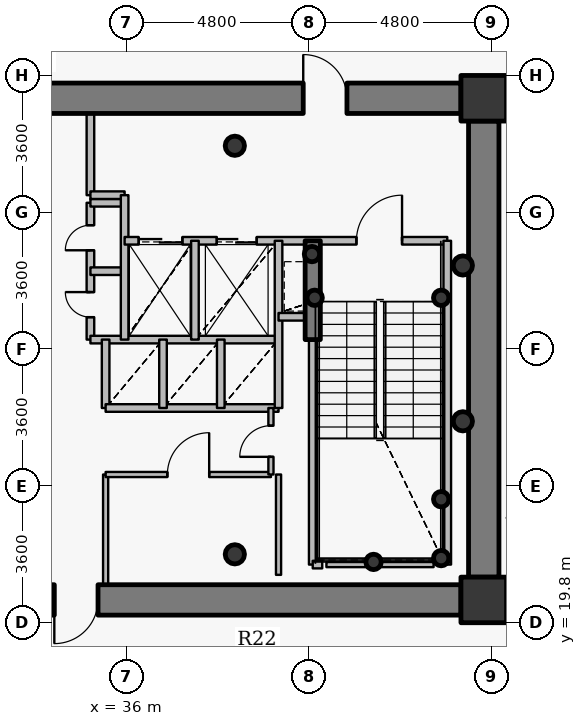
"""IFC4 building model, lengths in metres.
Left out: names, types, materials, properties, quantities, classifications, styles, units other than length and angle.
Written with IfcOpenShell. Run it as: python <this file> out.ifc"""

import sys

from ifc_helpers import new_model, si_unit, direction, frame, frame_2d, origin, origin_2d, place, context, subcontext, project, spatial, rectangle, hollow_circle, extrude, source, transform, mapped, element, fill, save


model = new_model("IFC4")
c1 = context("Model", 3, precision=1e-05, world=origin(), true_north=direction((0.0, 1.0)))
c2 = subcontext(c1, "Body", "Model", "MODEL_VIEW")
j1 = project(units=[si_unit("LENGTHUNIT", "METRE"), si_unit("PLANEANGLEUNIT", "RADIAN")], contexts=[c1])
p1 = place(None, origin())
s1 = spatial("IfcSite", under=j1, at=p1, CompositionType="ELEMENT")
p2 = place(p1, origin())
s2 = spatial("IfcBuilding", under=s1, at=p2, CompositionType="ELEMENT")
p3 = place(p2, frame((0.0, 0.0, 189.9)))
s3 = spatial("IfcBuildingStorey", under=s2, at=p3, CompositionType="ELEMENT", Elevation=189.9)
for number, where, z_axis, x_axis in (
    (1, (45.4, 20.4, 0.0), (0.0, 0.0, 1.0), (1.0, 0.0, 0.0)),
    (2, (45.4, 33.6, 0.0), (0.0, 0.0, 1.0), (1.0, 0.0, 0.0)),
):
    element("IfcColumn", number, at=place(p3, frame(where, z_axis=z_axis, x_axis=x_axis)), inside=s3, PredefinedType="COLUMN", context=c2, shape_type="SweptSolid", body=[
        extrude(rectangle(XDim=1.2, YDim=1.2, at=origin_2d()), origin(), (0.0, 0.0, 1.0), 3.75),
    ])
for number, where, z_axis, x_axis in (
    (3, (38.85, 21.6, 0.0), (0.0, 0.0, 1.0), (1.0, 0.0, 0.0)),
    (4, (38.85, 32.35, 0.0), (0.0, 0.0, 1.0), (1.0, 0.0, 0.0)),
):
    element("IfcColumn", number, at=place(p3, frame(where, z_axis=z_axis, x_axis=x_axis)), inside=s3, PredefinedType="COLUMN", context=c2, shape_type="SweptSolid", body=[
        extrude(hollow_circle(Radius=0.254, WallThickness=0.02, at=origin_2d()), origin(), (0.0, 0.0, 1.0), 3.75),
    ])
for number, where, z_axis, x_axis in (
    (5, (44.28, 21.5, 0.0), (0.0, 0.0, 1.0), (1.0, 0.0, 0.0)),
    (6, (44.28, 23.05, 0.0), (0.0, 0.0, 1.0), (1.0, 0.0, 0.0)),
    (7, (42.5, 21.4, 0.0), (0.0, 0.0, 1.0), (1.0, 0.0, 0.0)),
    (8, (40.95, 28.35, 0.0), (0.0, 0.0, 1.0), (1.0, 0.0, 0.0)),
    (9, (44.28, 28.35, 0.0), (0.0, 0.0, 1.0), (1.0, 0.0, 0.0)),
    (10, (40.88, 29.5, 0.0), (0.0, 0.0, 1.0), (1.0, 0.0, 0.0)),
):
    element("IfcColumn", number, at=place(p3, frame(where, z_axis=z_axis, x_axis=x_axis)), inside=s3, PredefinedType="COLUMN", context=c2, shape_type="SweptSolid", body=[
        extrude(hollow_circle(Radius=0.203, WallThickness=0.016, at=origin_2d()), origin(), (0.0, 0.0, 1.0), 3.75),
    ])
p4 = place(p3, frame((27.2, 33.6, 0.0), z_axis=(0.0, 0.0, 1.0), x_axis=(1.0, 0.0, 0.0)))
e11 = element("IfcWall", 11, at=p4, inside=s3, PredefinedType="SHEAR", context=c2, shape_type="SweptSolid", body=[
    extrude(rectangle(XDim=17.6, YDim=0.8, at=frame_2d((8.8, 0.0))), origin(), (0.0, 0.0, 1.0), 2.95),
])
p5 = place(p4, frame((13.45, 0.0, 0.0)))
e12 = element("IfcOpeningElement", 12, at=p5, cuts=e11, PredefinedType="OPENING", context=c2, shape_type="SweptSolid", body=[
    extrude(rectangle(XDim=1.15, YDim=2.15, at=origin_2d()), frame((0.575, 0.41, 1.075), z_axis=(0.0, -1.0, 0.0), x_axis=(1.0, 0.0, 0.0)), (0.0, 0.0, 1.0), 0.82),
])
p6 = place(p3, frame((45.4, 33.0, 0.0), z_axis=(0.0, 0.0, 1.0), x_axis=(0.0, -1.0, 0.0)))
e13 = element("IfcWall", 13, at=p6, inside=s3, PredefinedType="SHEAR", context=c2, shape_type="SweptSolid", body=[
    extrude(rectangle(XDim=12.0, YDim=0.8, at=frame_2d((6.0, 0.0))), origin(), (0.0, 0.0, 1.0), 2.95),
])
p7 = place(p3, frame((44.8, 20.4, 0.0), z_axis=(0.0, 0.0, 1.0), x_axis=(-1.0, 0.0, 0.0)))
e14 = element("IfcWall", 14, at=p7, inside=s3, PredefinedType="SHEAR", context=c2, shape_type="SweptSolid", body=[
    extrude(rectangle(XDim=17.6, YDim=0.8, at=frame_2d((8.8, 0.0))), origin(), (0.0, 0.0, 1.0), 2.95),
])
p8 = place(p7, frame((9.55, 0.0, 0.0)))
e15 = element("IfcOpeningElement", 15, at=p8, cuts=e14, PredefinedType="OPENING", context=c2, shape_type="SweptSolid", body=[
    extrude(rectangle(XDim=1.15, YDim=2.15, at=origin_2d()), frame((0.575, 0.41, 1.075), z_axis=(0.0, -1.0, 0.0), x_axis=(1.0, 0.0, 0.0)), (0.0, 0.0, 1.0), 0.82),
])
p9 = place(p3, frame((40.9, 27.25, 0.0), z_axis=(0.0, 0.0, 1.0), x_axis=(0.0, 1.0, 0.0)))
e16 = element("IfcWall", 16, at=p9, inside=s3, PredefinedType="SHEAR", context=c2, shape_type="SweptSolid", body=[
    extrude(rectangle(XDim=2.6, YDim=0.4, at=frame_2d((1.3, 0.0))), origin(), (0.0, 0.0, 1.0), 3.1),
])
for number, where, z_axis, x_axis in (
    (17, (44.85, 25.1, 0.0), (0.0, 0.0, 1.0), (1.0, 0.0, 0.0)),
    (18, (44.85, 29.2, 0.0), (0.0, 0.0, 1.0), (1.0, 0.0, 0.0)),
):
    element("IfcColumn", number, at=place(p3, frame(where, z_axis=z_axis, x_axis=x_axis)), inside=s3, PredefinedType="COLUMN", context=c2, shape_type="SweptSolid", body=[
        extrude(hollow_circle(Radius=0.254, WallThickness=0.02, at=origin_2d()), origin(), (0.0, 0.0, 1.0), 3.75),
    ])
p10 = place(p3, frame((35.05, 27.25, 0.0), z_axis=(0.0, 0.0, 1.0), x_axis=(0.0, 1.0, 0.0)))
e19 = element("IfcWall", 19, at=p10, inside=s3, PredefinedType="PARTITIONING", context=c2, shape_type="SweptSolid", body=[
    extrude(rectangle(XDim=3.6, YDim=0.2, at=frame_2d((1.8, 0.0))), origin(), (0.0, 0.0, 1.0), 3.5),
])
p11 = place(p10, frame((0.59, 0.0, 0.0)))
e20 = element("IfcOpeningElement", 20, at=p11, cuts=e19, PredefinedType="OPENING", context=c2, shape_type="SweptSolid", body=[
    extrude(rectangle(XDim=0.66, YDim=2.05, at=origin_2d()), frame((0.33, 0.11, 1.025), z_axis=(0.0, -1.0, 0.0), x_axis=(1.0, 0.0, 0.0)), (0.0, 0.0, 1.0), 0.22),
])
p12 = place(p10, frame((2.35, 0.0, 0.0)))
e21 = element("IfcOpeningElement", 21, at=p12, cuts=e19, PredefinedType="OPENING", context=c2, shape_type="SweptSolid", body=[
    extrude(rectangle(XDim=0.66, YDim=2.05, at=origin_2d()), frame((0.33, 0.11, 1.025), z_axis=(0.0, -1.0, 0.0), x_axis=(1.0, 0.0, 0.0)), (0.0, 0.0, 1.0), 0.22),
])
p13 = place(p3, frame((35.05, 27.25, 0.0), z_axis=(0.0, 0.0, 1.0), x_axis=(1.0, 0.0, 0.0)))
e22 = element("IfcWall", 22, at=p13, inside=s3, PredefinedType="PARTITIONING", context=c2, shape_type="SweptSolid", body=[
    extrude(rectangle(XDim=4.95, YDim=0.2, at=frame_2d((2.475, 0.0))), origin(), (0.0, 0.0, 1.0), 3.085),
])
for number, where, z_axis, x_axis in (
    (23, (35.05, 29.05, 0.0), (0.0, 0.0, 1.0), (1.0, 0.0, 0.0)),
    (24, (35.05, 30.85, 0.0), (0.0, 0.0, 1.0), (1.0, 0.0, 0.0)),
):
    element("IfcWall", number, at=place(p3, frame(where, z_axis=z_axis, x_axis=x_axis)), inside=s3, PredefinedType="PARTITIONING", context=c2, shape_type="SweptSolid", body=[
        extrude(rectangle(XDim=0.9, YDim=0.2, at=frame_2d((0.45, 0.0))), origin(), (0.0, 0.0, 1.0), 3.5),
    ])
p14 = place(p3, frame((35.05, 31.05, 0.0), z_axis=(0.0, 0.0, 1.0), x_axis=(0.0, 1.0, 0.0)))
e25 = element("IfcWall", 25, at=p14, inside=s3, PredefinedType="PARTITIONING", context=c2, shape_type="SweptSolid", body=[
    extrude(rectangle(XDim=2.15, YDim=0.2, at=frame_2d((1.075, 0.0))), origin(), (0.0, 0.0, 1.0), 3.085),
])
p15 = place(p3, frame((35.05, 31.05, 0.0), z_axis=(0.0, 0.0, 1.0), x_axis=(1.0, 0.0, 0.0)))
e26 = element("IfcWall", 26, at=p15, inside=s3, PredefinedType="PARTITIONING", context=c2, shape_type="SweptSolid", body=[
    extrude(rectangle(XDim=0.9, YDim=0.2, at=frame_2d((0.45, 0.0))), origin(), (0.0, 0.0, 1.0), 3.5),
])
p16 = place(p3, frame((35.45, 20.8, 0.0), z_axis=(0.0, 0.0, 1.0), x_axis=(0.0, 1.0, 0.0)))
e27 = element("IfcWall", 27, at=p16, inside=s3, PredefinedType="PARTITIONING", context=c2, shape_type="SweptSolid", body=[
    extrude(rectangle(XDim=2.9, YDim=0.135, at=frame_2d((1.45, 0.0))), origin(), (0.0, 0.0, 1.0), 3.085),
])
p17 = place(p3, frame((35.45, 23.7, 0.0), z_axis=(0.0, 0.0, 1.0), x_axis=(1.0, 0.0, 0.0)))
e28 = element("IfcWall", 28, at=p17, inside=s3, PredefinedType="PARTITIONING", context=c2, shape_type="SweptSolid", body=[
    extrude(rectangle(XDim=4.35, YDim=0.135, at=frame_2d((2.175, 0.0))), origin(), (0.0, 0.0, 1.0), 3.085),
])
p18 = place(p17, frame((1.625, 0.0, 0.0)))
e29 = element("IfcOpeningElement", 29, at=p18, cuts=e28, PredefinedType="OPENING", context=c2, shape_type="SweptSolid", body=[
    extrude(rectangle(XDim=1.1, YDim=2.15, at=origin_2d()), frame((0.55, 0.078, 1.075), z_axis=(0.0, -1.0, 0.0), x_axis=(1.0, 0.0, 0.0)), (0.0, 0.0, 1.0), 0.155),
])
p19 = place(p3, frame((35.45, 25.45, 0.0), z_axis=(0.0, 0.0, 1.0), x_axis=(0.0, 1.0, 0.0)))
e30 = element("IfcWall", 30, at=p19, inside=s3, PredefinedType="PARTITIONING", context=c2, shape_type="SweptSolid", body=[
    extrude(rectangle(XDim=1.8, YDim=0.2, at=frame_2d((0.9, 0.0))), origin(), (0.0, 0.0, 1.0), 3.5),
])
p20 = place(p3, frame((35.45, 25.45, 0.0), z_axis=(0.0, 0.0, 1.0), x_axis=(1.0, 0.0, 0.0)))
e31 = element("IfcWall", 31, at=p20, inside=s3, PredefinedType="PARTITIONING", context=c2, shape_type="SweptSolid", body=[
    extrude(rectangle(XDim=4.55, YDim=0.2, at=frame_2d((2.275, 0.0))), origin(), (0.0, 0.0, 1.0), 3.085),
])
p21 = place(p3, frame((35.95, 27.25, 0.0), z_axis=(0.0, 0.0, 1.0), x_axis=(0.0, 1.0, 0.0)))
e32 = element("IfcWall", 32, at=p21, inside=s3, PredefinedType="PARTITIONING", context=c2, shape_type="SweptSolid", body=[
    extrude(rectangle(XDim=3.8, YDim=0.2, at=frame_2d((1.9, 0.0))), origin(), (0.0, 0.0, 1.0), 3.5),
])
p22 = place(p3, frame((35.95, 29.85, 0.0), z_axis=(0.0, 0.0, 1.0), x_axis=(1.0, 0.0, 0.0)))
e33 = element("IfcWall", 33, at=p22, inside=s3, PredefinedType="PARTITIONING", context=c2, shape_type="SweptSolid", body=[
    extrude(rectangle(XDim=8.49, YDim=0.2, at=frame_2d((4.245, 0.0))), origin(), (0.0, 0.0, 1.0), 3.085),
])
p23 = place(p22, frame((6.1, 0.0, 0.0)))
e34 = element("IfcOpeningElement", 34, at=p23, cuts=e33, PredefinedType="OPENING", context=c2, shape_type="SweptSolid", body=[
    extrude(rectangle(XDim=1.2, YDim=2.15, at=origin_2d()), frame((0.6, 0.11, 1.075), z_axis=(0.0, -1.0, 0.0), x_axis=(1.0, 0.0, 0.0)), (0.0, 0.0, 1.0), 0.22),
])
p24 = place(p22, frame((0.37, 0.0, 0.0)))
e35 = element("IfcOpeningElement", 35, at=p24, cuts=e33, PredefinedType="OPENING", context=c2, shape_type="SweptSolid", body=[
    extrude(rectangle(XDim=1.15, YDim=2.15, at=origin_2d()), frame((0.575, 0.11, 1.075), z_axis=(0.0, -1.0, 0.0), x_axis=(1.0, 0.0, 0.0)), (0.0, 0.0, 1.0), 0.22),
])
p25 = place(p22, frame((2.425, 0.0, 0.0)))
e36 = element("IfcOpeningElement", 36, at=p25, cuts=e33, PredefinedType="OPENING", context=c2, shape_type="SweptSolid", body=[
    extrude(rectangle(XDim=1.05, YDim=2.15, at=origin_2d()), frame((0.525, 0.11, 1.075), z_axis=(0.0, -1.0, 0.0), x_axis=(1.0, 0.0, 0.0)), (0.0, 0.0, 1.0), 0.22),
])
p26 = place(p3, frame((36.96, 25.45, 0.0), z_axis=(0.0, 0.0, 1.0), x_axis=(0.0, 1.0, 0.0)))
e37 = element("IfcWall", 37, at=p26, inside=s3, PredefinedType="PARTITIONING", context=c2, shape_type="SweptSolid", body=[
    extrude(rectangle(XDim=1.8, YDim=0.2, at=frame_2d((0.9, 0.0))), origin(), (0.0, 0.0, 1.0), 3.5),
])
p27 = place(p3, frame((37.8, 27.25, 0.0), z_axis=(0.0, 0.0, 1.0), x_axis=(0.0, 1.0, 0.0)))
e38 = element("IfcWall", 38, at=p27, inside=s3, PredefinedType="PARTITIONING", context=c2, shape_type="SweptSolid", body=[
    extrude(rectangle(XDim=2.6, YDim=0.2, at=frame_2d((1.3, 0.0))), origin(), (0.0, 0.0, 1.0), 3.5),
])
p28 = place(p3, frame((38.48, 25.45, 0.0), z_axis=(0.0, 0.0, 1.0), x_axis=(0.0, 1.0, 0.0)))
e39 = element("IfcWall", 39, at=p28, inside=s3, PredefinedType="PARTITIONING", context=c2, shape_type="SweptSolid", body=[
    extrude(rectangle(XDim=1.8, YDim=0.2, at=frame_2d((0.9, 0.0))), origin(), (0.0, 0.0, 1.0), 3.5),
])
p29 = place(p3, frame((39.8, 23.7, 0.0), z_axis=(0.0, 0.0, 1.0), x_axis=(0.0, 1.0, 0.0)))
e40 = element("IfcWall", 40, at=p29, inside=s3, PredefinedType="PARTITIONING", context=c2, shape_type="SweptSolid", body=[
    extrude(rectangle(XDim=1.75, YDim=0.135, at=frame_2d((0.875, 0.0))), origin(), (0.0, 0.0, 1.0), 3.5),
])
p30 = place(p29, frame((0.465, 0.0, 0.0)))
e41 = element("IfcOpeningElement", 41, at=p30, cuts=e40, PredefinedType="OPENING", context=c2, shape_type="SweptSolid", body=[
    extrude(rectangle(XDim=0.82, YDim=2.1, at=origin_2d()), frame((0.41, 0.078, 1.05), z_axis=(0.0, -1.0, 0.0), x_axis=(1.0, 0.0, 0.0)), (0.0, 0.0, 1.0), 0.155),
])
p31 = place(p3, frame((40.0, 25.45, 0.0), z_axis=(0.0, 0.0, 1.0), x_axis=(0.0, 1.0, 0.0)))
e42 = element("IfcWall", 42, at=p31, inside=s3, PredefinedType="PARTITIONING", context=c2, shape_type="SweptSolid", body=[
    extrude(rectangle(XDim=4.4, YDim=0.2, at=frame_2d((2.2, 0.0))), origin(), (0.0, 0.0, 1.0), 3.5),
])
p32 = place(p3, frame((40.0, 27.85, 0.0), z_axis=(0.0, 0.0, 1.0), x_axis=(1.0, 0.0, 0.0)))
e43 = element("IfcWall", 43, at=p32, inside=s3, PredefinedType="PARTITIONING", context=c2, shape_type="SweptSolid", body=[
    extrude(rectangle(XDim=0.9, YDim=0.2, at=frame_2d((0.45, 0.0))), origin(), (0.0, 0.0, 1.0), 3.5),
])
p33 = place(p3, frame((40.9, 21.33, 0.0), z_axis=(0.0, 0.0, 1.0), x_axis=(0.0, 1.0, 0.0)))
e44 = element("IfcWall", 44, at=p33, inside=s3, PredefinedType="PARTITIONING", context=c2, shape_type="SweptSolid", body=[
    extrude(rectangle(XDim=5.91, YDim=0.2, at=frame_2d((2.955, 0.0))), origin(), (0.0, 0.0, 1.0), 3.035),
])
p34 = place(p3, frame((40.9, 21.33, 0.0), z_axis=(0.0, 0.0, 1.0), x_axis=(1.0, 0.0, 0.0)))
e45 = element("IfcWall", 45, at=p34, inside=s3, PredefinedType="PARTITIONING", context=c2, shape_type="SweptSolid", body=[
    extrude(rectangle(XDim=0.25, YDim=0.2, at=frame_2d((0.125, 0.0))), origin(), (0.0, 0.0, 1.0), 3.035),
])
p35 = place(p3, frame((44.44, 21.33, 0.0), z_axis=(0.0, 0.0, 1.0), x_axis=(0.0, 1.0, 0.0)))
e46 = element("IfcWall", 46, at=p35, inside=s3, PredefinedType="PARTITIONING", context=c2, shape_type="SweptSolid", body=[
    extrude(rectangle(XDim=8.52, YDim=0.2, at=frame_2d((4.26, 0.0))), origin(), (0.0, 0.0, 1.0), 3.5),
])
p36 = place(p3, frame((45.8, 20.05, 0.0), z_axis=(0.0, 0.0, 1.0), x_axis=(1.0, 0.0, 0.0)))
e47 = element("IfcWall", 47, at=p36, inside=s3, PredefinedType="PARTITIONING", context=c2, shape_type="SweptSolid", body=[
    extrude(rectangle(XDim=2.4, YDim=0.135, at=frame_2d((1.2, 0.0))), origin(), (0.0, 0.0, 1.0), 3.5),
])
p37 = place(p3, frame((45.8, 33.95, 0.0), z_axis=(0.0, 0.0, 1.0), x_axis=(1.0, 0.0, 0.0)))
e48 = element("IfcWall", 48, at=p37, inside=s3, PredefinedType="PARTITIONING", context=c2, shape_type="SweptSolid", body=[
    extrude(rectangle(XDim=9.197, YDim=0.135, at=frame_2d((4.599, 0.0))), origin(), (0.0, 0.0, 1.0), 3.5),
])
p38 = place(p37, frame((4.098, 0.0, 0.0)))
e49 = element("IfcOpeningElement", 49, at=p38, cuts=e48, PredefinedType="OPENING", context=c2, shape_type="SweptSolid", body=[
    extrude(rectangle(XDim=1.0, YDim=2.15, at=origin_2d()), frame((0.5, 0.078, 1.075), z_axis=(0.0, -1.0, 0.0), x_axis=(1.0, 0.0, 0.0)), (0.0, 0.0, 1.0), 0.155),
])
p39 = place(p3, frame((44.08, 21.33, 0.0), z_axis=(0.0, 0.0, 1.0), x_axis=(-1.0, 0.0, 0.0)))
e50 = element("IfcWall", 50, at=p39, inside=s3, PredefinedType="PARTITIONING", context=c2, shape_type="SweptSolid", body=[
    extrude(rectangle(XDim=2.82, YDim=0.135, at=frame_2d((1.41, 0.0))), origin(), (0.0, 0.0, 1.0), 3.035),
])
p40 = place(p3, frame((40.0, 23.7, 0.0), z_axis=(0.0, 0.0, 1.0), x_axis=(0.0, -1.0, 0.0)))
e51 = element("IfcWall", 51, at=p40, inside=s3, PredefinedType="PARTITIONING", context=c2, shape_type="SweptSolid", body=[
    extrude(rectangle(XDim=2.64, YDim=0.135, at=frame_2d((1.32, 0.0))), origin(), (0.0, 0.0, 1.0), 3.035),
])
for number, where, z_axis, x_axis in (
    (52, (45.79, 34.0, 0.0), (0.0, 0.0, 1.0), (-1.0, 0.0, 0.0)),
    (53, (44.81, 20.0, 0.0), (0.0, 0.0, 1.0), (1.0, 0.0, 0.0)),
):
    element("IfcWall", number, at=place(p3, frame(where, z_axis=z_axis, x_axis=x_axis)), inside=s3, PredefinedType="PARTITIONING", context=c2, shape_type="SweptSolid", body=[
        extrude(rectangle(XDim=0.98, YDim=0.135, at=frame_2d((0.49, 0.0))), origin(), (0.0, 0.0, 1.0), 2.935),
    ])
for number, where, z_axis, x_axis in (
    (54, (45.8, 20.377, 0.0), (0.0, 0.0, 1.0), (0.0, 1.0, 0.0)),
    (55, (45.8, 33.01, 0.0), (0.0, 0.0, 1.0), (0.0, 1.0, 0.0)),
):
    element("IfcWall", number, at=place(p3, frame(where, z_axis=z_axis, x_axis=x_axis)), inside=s3, PredefinedType="PARTITIONING", context=c2, shape_type="SweptSolid", body=[
        extrude(rectangle(XDim=0.613, YDim=0.135, at=frame_2d((0.306, 0.0))), origin(), (0.0, 0.0, 1.0), 3.5),
    ])
m1 = source(origin(), c2, "Body", "SweptSolid", [
    extrude(rectangle(XDim=1.15, YDim=2.15, at=origin_2d()), frame((0.575, 0.025, 1.075), z_axis=(0.0, -1.0, 0.0), x_axis=(1.0, 0.0, 0.0)), (0.0, 0.0, 1.0), 0.05),
])
p41 = place(p5, origin())
e56 = element("IfcDoor", 56, at=p41, inside=s3, OperationType="SINGLE_SWING_LEFT", PredefinedType="DOOR", context=c2, shape_type="MappedRepresentation", body=[
    mapped(m1, transform((0.0, 0.0, 0.0), x_axis=(1.0, 0.0, 0.0), y_axis=(0.0, 1.0, 0.0), z_axis=(0.0, 0.0, 1.0), scale=1.0)),
])
fill(e12, e56)
p42 = place(p8, origin())
e57 = element("IfcDoor", 57, at=p42, inside=s3, OperationType="SINGLE_SWING_RIGHT", PredefinedType="DOOR", context=c2, shape_type="MappedRepresentation", body=[
    mapped(m1, transform((0.0, 0.0, 0.0), x_axis=(1.0, 0.0, 0.0), y_axis=(0.0, 1.0, 0.0), z_axis=(0.0, 0.0, 1.0), scale=1.0)),
])
fill(e15, e57)
m2 = source(origin(), c2, "Body", "SweptSolid", [
    extrude(rectangle(XDim=1.2, YDim=2.15, at=origin_2d()), frame((0.6, 0.025, 1.075), z_axis=(0.0, -1.0, 0.0), x_axis=(1.0, 0.0, 0.0)), (0.0, 0.0, 1.0), 0.05),
])
p43 = place(p23, origin())
e58 = element("IfcDoor", 58, at=p43, inside=s3, OperationType="SINGLE_SWING_RIGHT", PredefinedType="DOOR", context=c2, shape_type="MappedRepresentation", body=[
    mapped(m2, transform((0.0, 0.0, 0.0), x_axis=(1.0, 0.0, 0.0), y_axis=(0.0, 1.0, 0.0), z_axis=(0.0, 0.0, 1.0), scale=1.0)),
])
fill(e34, e58)
m3 = source(origin(), c2, "Body", "SweptSolid", [
    extrude(rectangle(XDim=1.15, YDim=2.15, at=origin_2d()), frame((0.575, 0.025, 1.075), z_axis=(0.0, -1.0, 0.0), x_axis=(1.0, 0.0, 0.0)), (0.0, 0.0, 1.0), 0.05),
])
p44 = place(p24, origin())
e59 = element("IfcDoor", 59, at=p44, inside=s3, OperationType="DOUBLE_DOOR_SLIDING", PredefinedType="USERDEFINED", context=c2, shape_type="MappedRepresentation", body=[
    mapped(m3, transform((0.0, 0.0, 0.0), x_axis=(1.0, 0.0, 0.0), y_axis=(0.0, 1.0, 0.0), z_axis=(0.0, 0.0, 1.0), scale=1.0)),
])
fill(e35, e59)
m4 = source(origin(), c2, "Body", "SweptSolid", [
    extrude(rectangle(XDim=1.05, YDim=2.15, at=origin_2d()), frame((0.525, 0.025, 1.075), z_axis=(0.0, -1.0, 0.0), x_axis=(1.0, 0.0, 0.0)), (0.0, 0.0, 1.0), 0.05),
])
p45 = place(p25, origin())
e60 = element("IfcDoor", 60, at=p45, inside=s3, OperationType="DOUBLE_DOOR_SLIDING", PredefinedType="USERDEFINED", context=c2, shape_type="MappedRepresentation", body=[
    mapped(m4, transform((0.0, 0.0, 0.0), x_axis=(1.0, 0.0, 0.0), y_axis=(0.0, 1.0, 0.0), z_axis=(0.0, 0.0, 1.0), scale=1.0)),
])
fill(e36, e60)
m5 = source(origin(), c2, "Body", "SweptSolid", [
    extrude(rectangle(XDim=0.66, YDim=2.05, at=origin_2d()), frame((0.33, 0.025, 1.025), z_axis=(0.0, -1.0, 0.0), x_axis=(1.0, 0.0, 0.0)), (0.0, 0.0, 1.0), 0.05),
])
p46 = place(p11, origin())
e61 = element("IfcDoor", 61, at=p46, inside=s3, OperationType="SINGLE_SWING_RIGHT", PredefinedType="USERDEFINED", context=c2, shape_type="MappedRepresentation", body=[
    mapped(m5, transform((0.0, 0.0, 0.0), x_axis=(1.0, 0.0, 0.0), y_axis=(0.0, 1.0, 0.0), z_axis=(0.0, 0.0, 1.0), scale=1.0)),
])
fill(e20, e61)
p47 = place(p12, origin())
e62 = element("IfcDoor", 62, at=p47, inside=s3, OperationType="SINGLE_SWING_LEFT", PredefinedType="USERDEFINED", context=c2, shape_type="MappedRepresentation", body=[
    mapped(m5, transform((0.0, 0.0, 0.0), x_axis=(1.0, 0.0, 0.0), y_axis=(0.0, 1.0, 0.0), z_axis=(0.0, 0.0, 1.0), scale=1.0)),
])
fill(e21, e62)
m6 = source(origin(), c2, "Body", "SweptSolid", [
    extrude(rectangle(XDim=1.1, YDim=2.15, at=origin_2d()), frame((0.55, 0.025, 1.075), z_axis=(0.0, -1.0, 0.0), x_axis=(1.0, 0.0, 0.0)), (0.0, 0.0, 1.0), 0.05),
])
p48 = place(p18, origin())
e63 = element("IfcDoor", 63, at=p48, inside=s3, OperationType="SINGLE_SWING_RIGHT", PredefinedType="DOOR", context=c2, shape_type="MappedRepresentation", body=[
    mapped(m6, transform((0.0, 0.0, 0.0), x_axis=(1.0, 0.0, 0.0), y_axis=(0.0, 1.0, 0.0), z_axis=(0.0, 0.0, 1.0), scale=1.0)),
])
fill(e29, e63)
m7 = source(origin(), c2, "Body", "SweptSolid", [
    extrude(rectangle(XDim=0.82, YDim=2.1, at=origin_2d()), frame((0.41, 0.025, 1.05), z_axis=(0.0, -1.0, 0.0), x_axis=(1.0, 0.0, 0.0)), (0.0, 0.0, 1.0), 0.05),
])
p49 = place(p30, origin())
e64 = element("IfcDoor", 64, at=p49, inside=s3, OperationType="SINGLE_SWING_LEFT", PredefinedType="DOOR", context=c2, shape_type="MappedRepresentation", body=[
    mapped(m7, transform((0.0, 0.0, 0.0), x_axis=(1.0, 0.0, 0.0), y_axis=(0.0, 1.0, 0.0), z_axis=(0.0, 0.0, 1.0), scale=1.0)),
])
fill(e41, e64)
save(model, sys.argv[1])
